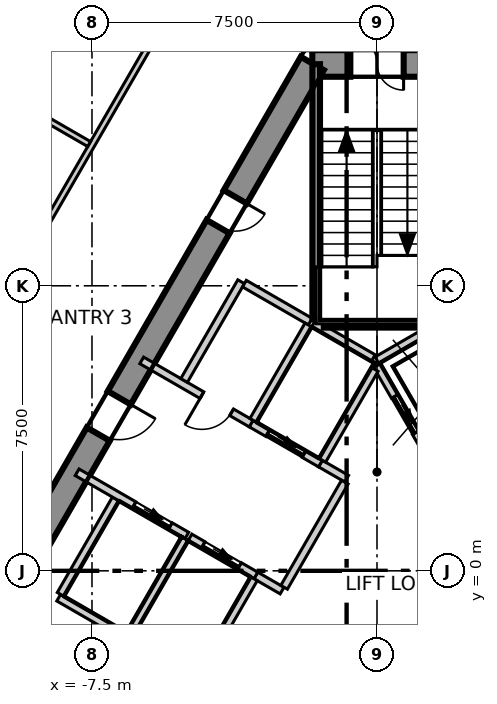
"""IFC4 building model, lengths in metres.
Left out: names, types, materials, properties, quantities, classifications, styles, units other than length and angle.
Written with IfcOpenShell. Run it as: python <this file> out.ifc"""

import sys

from ifc_helpers import new_model, si_unit, direction, frame, frame_2d, origin, place, context, subcontext, project, spatial, polyline, rectangle, outline, extrude, element, fill, save


model = new_model("IFC4")
c1 = context("Model", 3, precision=1e-05, world=origin(), true_north=direction((0.0, 1.0)))
c2 = subcontext(c1, "Body", "Model", "MODEL_VIEW")
j1 = project(units=[si_unit("LENGTHUNIT", "METRE"), si_unit("PLANEANGLEUNIT", "RADIAN")], contexts=[c1])
p1 = place(None, origin())
s1 = spatial("IfcSite", under=j1, at=p1, CompositionType="ELEMENT")
p2 = place(p1, origin())
s2 = spatial("IfcBuilding", under=s1, at=p2, CompositionType="ELEMENT")
p3 = place(p2, frame((0.0, 0.0, 227.3)))
s3 = spatial("IfcBuildingStorey", under=s2, at=p3, CompositionType="ELEMENT", Elevation=227.3)
p4 = place(p3, frame((1.703, 13.35, -0.3), z_axis=(0.0, 0.0, 1.0), x_axis=(-1.0, 0.0, 0.0)))
e1 = element("IfcWall", 1, at=p4, inside=s3, PredefinedType="SHEAR", context=c2, shape_type="SweptSolid", body=[
    extrude(outline(polyline([(-0.202, -0.35), (1.703, -0.35), (3.608, -0.35), (3.204, 0.35), (1.703, 0.35), (0.202, 0.35), (-0.202, -0.35)])), origin(), (0.0, 0.0, 1.0), 4.0),
])
p5 = place(p4, frame((1.003, 0.0, 0.3)))
e2 = element("IfcOpeningElement", 2, at=p5, cuts=e1, PredefinedType="OPENING", context=c2, shape_type="SweptSolid", body=[
    extrude(rectangle(XDim=1.4, YDim=2.1, at=frame_2d((0.7, 1.05))), frame((0.0, 0.36, 0.0), z_axis=(0.0, -1.0, 0.0), x_axis=(1.0, 0.0, 0.0)), (0.0, 0.0, 1.0), 0.72),
])
p6 = place(p3, frame((-1.703, 13.35, -0.3), z_axis=(0.0, 0.0, 1.0), x_axis=(-0.500011533395, -0.866018744874, 0.0)))
e3 = element("IfcWall", 3, at=p6, inside=s3, PredefinedType="SHEAR", context=c2, shape_type="SweptSolid", body=[
    extrude(outline(polyline([(-0.202, -0.35), (1.782, -0.35), (3.766, -0.35), (5.75, -0.35), (7.734, -0.35), (9.718, -0.35), (11.702, -0.35), (13.686, -0.35), (15.67, -0.35), (17.654, -0.35), (19.638, -0.35), (21.622, -0.35), (21.218, 0.35), (19.307, 0.35), (17.397, 0.35), (15.486, 0.35), (13.576, 0.35), (11.665, 0.35), (9.755, 0.35), (7.844, 0.35), (5.934, 0.35), (4.023, 0.35), (2.113, 0.35), (0.202, 0.35), (-0.202, -0.35)])), origin(), (0.0, 0.0, 1.0), 4.0),
])
p7 = place(p6, frame((10.16, 0.0, 0.3)))
e4 = element("IfcOpeningElement", 4, at=p7, cuts=e3, PredefinedType="OPENING", context=c2, shape_type="SweptSolid", body=[
    extrude(rectangle(XDim=1.1, YDim=2.1, at=frame_2d((0.55, 1.05))), frame((0.0, 0.36, 0.0), z_axis=(0.0, -1.0, 0.0), x_axis=(1.0, 0.0, 0.0)), (0.0, 0.0, 1.0), 0.72),
])
p8 = place(p6, frame((16.465, 0.0, 0.3)))
e5 = element("IfcOpeningElement", 5, at=p8, cuts=e3, PredefinedType="OPENING", context=c2, shape_type="SweptSolid", body=[
    extrude(rectangle(XDim=0.9, YDim=2.1, at=frame_2d((0.45, 1.05))), frame((0.0, 0.36, 0.0), z_axis=(0.0, -1.0, 0.0), x_axis=(1.0, 0.0, 0.0)), (0.0, 0.0, 1.0), 0.72),
])
p9 = place(p6, frame((4.055, 0.0, 0.3)))
e6 = element("IfcOpeningElement", 6, at=p9, cuts=e3, PredefinedType="OPENING", context=c2, shape_type="SweptSolid", body=[
    extrude(rectangle(XDim=0.9, YDim=2.1, at=frame_2d((0.45, 1.05))), frame((0.0, 0.36, 0.0), z_axis=(0.0, -1.0, 0.0), x_axis=(1.0, 0.0, 0.0)), (0.0, 0.0, 1.0), 0.72),
])
p10 = place(p3, frame((-2.732, 30.501, 0.0), z_axis=(0.0, 0.0, 1.0), x_axis=(-0.500023345841, -0.866011924637, 0.0)))
e7 = element("IfcWall", 7, at=p10, inside=s3, PredefinedType="ELEMENTEDWALL", context=c2, shape_type="SweptSolid", body=[
    extrude(rectangle(XDim=50.078, YDim=0.2, at=frame_2d((25.039, 0.0))), origin(), (0.0, 0.0, 1.0), 3.7),
])
p11 = place(p10, frame((2.171, 0.0, 0.9)))
e8 = element("IfcOpeningElement", 8, at=p11, cuts=e7, PredefinedType="OPENING", context=c2, shape_type="SweptSolid", body=[
    extrude(rectangle(XDim=4.2, YDim=2.5, at=frame_2d((2.1, 1.25))), frame((0.0, 0.11, 0.0), z_axis=(0.0, -1.0, 0.0), x_axis=(1.0, 0.0, 0.0)), (0.0, 0.0, 1.0), 0.22),
])
p12 = place(p10, frame((8.107, 0.0, 0.9)))
e9 = element("IfcOpeningElement", 9, at=p12, cuts=e7, PredefinedType="OPENING", context=c2, shape_type="SweptSolid", body=[
    extrude(rectangle(XDim=4.2, YDim=2.5, at=frame_2d((2.1, 1.25))), frame((0.0, 0.11, 0.0), z_axis=(0.0, -1.0, 0.0), x_axis=(1.0, 0.0, 0.0)), (0.0, 0.0, 1.0), 0.22),
])
p13 = place(p10, frame((14.044, 0.0, 0.9)))
e10 = element("IfcOpeningElement", 10, at=p13, cuts=e7, PredefinedType="OPENING", context=c2, shape_type="SweptSolid", body=[
    extrude(rectangle(XDim=4.2, YDim=2.5, at=frame_2d((2.1, 1.25))), frame((0.0, 0.11, 0.0), z_axis=(0.0, -1.0, 0.0), x_axis=(1.0, 0.0, 0.0)), (0.0, 0.0, 1.0), 0.22),
])
p14 = place(p10, frame((19.98, 0.0, 0.9)))
e11 = element("IfcOpeningElement", 11, at=p14, cuts=e7, PredefinedType="OPENING", context=c2, shape_type="SweptSolid", body=[
    extrude(rectangle(XDim=4.2, YDim=2.5, at=frame_2d((2.1, 1.25))), frame((0.0, 0.11, 0.0), z_axis=(0.0, -1.0, 0.0), x_axis=(1.0, 0.0, 0.0)), (0.0, 0.0, 1.0), 0.22),
])
p15 = place(p10, frame((25.917, 0.0, 0.9)))
e12 = element("IfcOpeningElement", 12, at=p15, cuts=e7, PredefinedType="OPENING", context=c2, shape_type="SweptSolid", body=[
    extrude(rectangle(XDim=4.2, YDim=2.5, at=frame_2d((2.1, 1.25))), frame((0.0, 0.11, 0.0), z_axis=(0.0, -1.0, 0.0), x_axis=(1.0, 0.0, 0.0)), (0.0, 0.0, 1.0), 0.22),
])
p16 = place(p10, frame((31.853, 0.0, 0.9)))
e13 = element("IfcOpeningElement", 13, at=p16, cuts=e7, PredefinedType="OPENING", context=c2, shape_type="SweptSolid", body=[
    extrude(rectangle(XDim=4.2, YDim=2.5, at=frame_2d((2.1, 1.25))), frame((0.0, 0.11, 0.0), z_axis=(0.0, -1.0, 0.0), x_axis=(1.0, 0.0, 0.0)), (0.0, 0.0, 1.0), 0.22),
])
p17 = place(p10, frame((37.79, 0.0, 0.9)))
e14 = element("IfcOpeningElement", 14, at=p17, cuts=e7, PredefinedType="OPENING", context=c2, shape_type="SweptSolid", body=[
    extrude(rectangle(XDim=4.2, YDim=2.5, at=frame_2d((2.1, 1.25))), frame((0.0, 0.11, 0.0), z_axis=(0.0, -1.0, 0.0), x_axis=(1.0, 0.0, 0.0)), (0.0, 0.0, 1.0), 0.22),
])
p18 = place(p10, frame((43.726, 0.0, 0.9)))
e15 = element("IfcOpeningElement", 15, at=p18, cuts=e7, PredefinedType="OPENING", context=c2, shape_type="SweptSolid", body=[
    extrude(rectangle(XDim=4.2, YDim=2.5, at=frame_2d((2.1, 1.25))), frame((0.0, 0.11, 0.0), z_axis=(0.0, -1.0, 0.0), x_axis=(1.0, 0.0, 0.0)), (0.0, 0.0, 1.0), 0.22),
])
p19 = place(p3, frame((-20.882, -11.969, 0.0), z_axis=(0.0, 0.0, 1.0), x_axis=(0.499998738735, 0.866026131975, 0.0)))
e16 = element("IfcWall", 16, at=p19, inside=s3, PredefinedType="PARTITIONING", context=c2, shape_type="SweptSolid", body=[
    extrude(rectangle(XDim=41.764, YDim=0.15, at=frame_2d((20.882, 0.0))), origin(), (0.0, 0.0, 1.0), 3.7),
])
p20 = place(p19, frame((33.714, 0.0, 0.0)))
e17 = element("IfcOpeningElement", 17, at=p20, cuts=e16, PredefinedType="OPENING", context=c2, shape_type="SweptSolid", body=[
    extrude(rectangle(XDim=1.1, YDim=2.1, at=frame_2d((0.55, 1.05))), frame((0.0, 0.085, 0.0), z_axis=(0.0, -1.0, 0.0), x_axis=(1.0, 0.0, 0.0)), (0.0, 0.0, 1.0), 0.17),
])
p21 = place(p19, frame((23.293, 0.0, 0.0)))
e18 = element("IfcOpeningElement", 18, at=p21, cuts=e16, PredefinedType="OPENING", context=c2, shape_type="SweptSolid", body=[
    extrude(rectangle(XDim=1.0, YDim=2.1, at=frame_2d((0.5, 1.05))), frame((0.0, 0.085, 0.0), z_axis=(0.0, -1.0, 0.0), x_axis=(1.0, 0.0, 0.0)), (0.0, 0.0, 1.0), 0.17),
])
p22 = place(p19, frame((13.356, 0.0, 0.0)))
e19 = element("IfcOpeningElement", 19, at=p22, cuts=e16, PredefinedType="OPENING", context=c2, shape_type="SweptSolid", body=[
    extrude(rectangle(XDim=1.1, YDim=2.1, at=frame_2d((0.55, 1.05))), frame((0.0, 0.085, 0.0), z_axis=(0.0, -1.0, 0.0), x_axis=(1.0, 0.0, 0.0)), (0.0, 0.0, 1.0), 0.17),
])
p23 = place(p19, frame((18.556, 0.0, 0.0)))
e20 = element("IfcOpeningElement", 20, at=p23, cuts=e16, PredefinedType="OPENING", context=c2, shape_type="SweptSolid", body=[
    extrude(rectangle(XDim=0.9, YDim=2.1, at=frame_2d((0.45, 1.05))), frame((0.0, 0.085, 0.0), z_axis=(0.0, -1.0, 0.0), x_axis=(1.0, 0.0, 0.0)), (0.0, 0.0, 1.0), 0.17),
])
p24 = place(p19, frame((15.556, 0.0, 0.0)))
e21 = element("IfcOpeningElement", 21, at=p24, cuts=e16, PredefinedType="OPENING", context=c2, shape_type="SweptSolid", body=[
    extrude(rectangle(XDim=0.9, YDim=2.1, at=frame_2d((0.45, 1.05))), frame((0.0, 0.085, 0.0), z_axis=(0.0, -1.0, 0.0), x_axis=(1.0, 0.0, 0.0)), (0.0, 0.0, 1.0), 0.17),
])
p25 = place(p19, frame((3.883, 0.0, 0.0)))
e22 = element("IfcOpeningElement", 22, at=p25, cuts=e16, PredefinedType="OPENING", context=c2, shape_type="SweptSolid", body=[
    extrude(rectangle(XDim=1.1, YDim=2.1, at=frame_2d((0.55, 1.05))), frame((0.0, 0.085, 0.0), z_axis=(0.0, -1.0, 0.0), x_axis=(1.0, 0.0, 0.0)), (0.0, 0.0, 1.0), 0.17),
])
p26 = place(p3, frame((-12.219, 13.91, 0.0), z_axis=(0.0, 0.0, 1.0), x_axis=(0.866052151752, -0.499953668299, 0.0)))
e23 = element("IfcWall", 23, at=p26, inside=s3, PredefinedType="PARTITIONING", context=c2, shape_type="SweptSolid", body=[
    extrude(rectangle(XDim=5.362, YDim=0.15, at=frame_2d((2.681, 0.0))), origin(), (0.0, 0.0, 1.0), 3.7),
])
p27 = place(p3, frame((0.075, 24.07, 0.0), z_axis=(0.0, 0.0, 1.0), x_axis=(0.49999939571, -0.866025752671, 0.0)))
e24 = element("IfcWall", 24, at=p27, inside=s3, PredefinedType="PARTITIONING", context=c2, shape_type="SweptSolid", body=[
    extrude(rectangle(XDim=41.614, YDim=0.15, at=frame_2d((20.807, 0.0))), origin(), (0.0, 0.0, 1.0), 3.7),
])
p28 = place(p27, frame((36.714, 0.0, 0.0)))
e25 = element("IfcOpeningElement", 25, at=p28, cuts=e24, PredefinedType="OPENING", context=c2, shape_type="SweptSolid", body=[
    extrude(rectangle(XDim=1.1, YDim=2.1, at=frame_2d((0.55, 1.05))), frame((0.0, 0.085, 0.0), z_axis=(0.0, -1.0, 0.0), x_axis=(1.0, 0.0, 0.0)), (0.0, 0.0, 1.0), 0.17),
])
p29 = place(p27, frame((21.831, 0.0, 0.0)))
e26 = element("IfcOpeningElement", 26, at=p29, cuts=e24, PredefinedType="OPENING", context=c2, shape_type="SweptSolid", body=[
    extrude(rectangle(XDim=1.1, YDim=2.1, at=frame_2d((0.55, 1.05))), frame((0.0, 0.085, 0.0), z_axis=(0.0, -1.0, 0.0), x_axis=(1.0, 0.0, 0.0)), (0.0, 0.0, 1.0), 0.17),
])
p30 = place(p27, frame((30.631, 0.0, 0.0)))
e27 = element("IfcOpeningElement", 27, at=p30, cuts=e24, PredefinedType="OPENING", context=c2, shape_type="SweptSolid", body=[
    extrude(rectangle(XDim=0.9, YDim=2.1, at=frame_2d((0.45, 1.05))), frame((0.0, 0.085, 0.0), z_axis=(0.0, -1.0, 0.0), x_axis=(1.0, 0.0, 0.0)), (0.0, 0.0, 1.0), 0.17),
])
p31 = place(p27, frame((27.431, 0.0, 0.0)))
e28 = element("IfcOpeningElement", 28, at=p31, cuts=e24, PredefinedType="OPENING", context=c2, shape_type="SweptSolid", body=[
    extrude(rectangle(XDim=0.9, YDim=2.1, at=frame_2d((0.45, 1.05))), frame((0.0, 0.085, 0.0), z_axis=(0.0, -1.0, 0.0), x_axis=(1.0, 0.0, 0.0)), (0.0, 0.0, 1.0), 0.17),
])
p32 = place(p27, frame((24.631, 0.0, 0.0)))
e29 = element("IfcOpeningElement", 29, at=p32, cuts=e24, PredefinedType="OPENING", context=c2, shape_type="SweptSolid", body=[
    extrude(rectangle(XDim=1.0, YDim=2.1, at=frame_2d((0.5, 1.05))), frame((0.0, 0.085, 0.0), z_axis=(0.0, -1.0, 0.0), x_axis=(1.0, 0.0, 0.0)), (0.0, 0.0, 1.0), 0.17),
])
p33 = place(p27, frame((14.358, 0.0, 0.0)))
e30 = element("IfcOpeningElement", 30, at=p33, cuts=e24, PredefinedType="OPENING", context=c2, shape_type="SweptSolid", body=[
    extrude(rectangle(XDim=1.1, YDim=2.1, at=frame_2d((0.55, 1.05))), frame((0.0, 0.085, 0.0), z_axis=(0.0, -1.0, 0.0), x_axis=(1.0, 0.0, 0.0)), (0.0, 0.0, 1.0), 0.17),
])
p34 = place(p27, frame((3.885, 0.0, 0.0)))
e31 = element("IfcOpeningElement", 31, at=p34, cuts=e24, PredefinedType="OPENING", context=c2, shape_type="SweptSolid", body=[
    extrude(rectangle(XDim=1.1, YDim=2.1, at=frame_2d((0.55, 1.05))), frame((0.0, 0.085, 0.0), z_axis=(0.0, -1.0, 0.0), x_axis=(1.0, 0.0, 0.0)), (0.0, 0.0, 1.0), 0.17),
])
p35 = place(p3, frame((-8.376, -0.707, 0.0), z_axis=(0.0, 0.0, 1.0), x_axis=(0.866067520717, -0.499927044236, 0.0)))
e32 = element("IfcWall", 32, at=p35, inside=s3, PredefinedType="SOLIDWALL", context=c2, shape_type="SweptSolid", body=[
    extrude(rectangle(XDim=2.1, YDim=0.2, at=frame_2d((1.05, 0.0))), origin(), (0.0, 0.0, 1.0), 3.7),
])
p36 = place(p3, frame((-8.326, -0.62, 0.0), z_axis=(0.0, 0.0, 1.0), x_axis=(0.500023687443, 0.866011727401, 0.0)))
e33 = element("IfcWall", 33, at=p36, inside=s3, PredefinedType="SOLIDWALL", context=c2, shape_type="SweptSolid", body=[
    extrude(rectangle(XDim=2.9, YDim=0.2, at=frame_2d((1.45, 0.0))), origin(), (0.0, 0.0, 1.0), 3.7),
])
p37 = place(p3, frame((-0.002, 5.541, 0.0), z_axis=(0.0, 0.0, 1.0), x_axis=(0.86600155993, 0.500041296494, 0.0)))
e34 = element("IfcWall", 34, at=p37, inside=s3, PredefinedType="SOLIDWALL", context=c2, shape_type="SweptSolid", body=[
    extrude(rectangle(XDim=4.132, YDim=0.2, at=frame_2d((2.066, 0.0))), origin(), (0.0, 0.0, 1.0), 3.7),
])
p38 = place(p3, frame((0.0, 5.4, 0.0), z_axis=(0.0, 0.0, 1.0), x_axis=(0.500103862429, -0.865965430478, 0.0)))
e35 = element("IfcWall", 35, at=p38, inside=s3, PredefinedType="SOLIDWALL", context=c2, shape_type="SweptSolid", body=[
    extrude(rectangle(XDim=2.973, YDim=0.2, at=frame_2d((1.487, 0.0))), origin(), (0.0, 0.0, 1.0), 3.7),
])
p39 = place(p38, frame((0.937, 0.0, 0.0)))
e36 = element("IfcOpeningElement", 36, at=p39, cuts=e35, PredefinedType="OPENING", context=c2, shape_type="SweptSolid", body=[
    extrude(rectangle(XDim=1.1, YDim=2.1, at=frame_2d((0.55, 1.05))), frame((0.0, 0.11, 0.0), z_axis=(0.0, -1.0, 0.0), x_axis=(1.0, 0.0, 0.0)), (0.0, 0.0, 1.0), 0.22),
])
p40 = place(p3, frame((-7.891, 2.593, 0.0), z_axis=(0.0, 0.0, 1.0), x_axis=(0.866070917804, -0.499921159118, 0.0)))
e37 = element("IfcWall", 37, at=p40, inside=s3, PredefinedType="SOLIDWALL", context=c2, shape_type="SweptSolid", body=[
    extrude(rectangle(XDim=3.333, YDim=0.2, at=frame_2d((1.666, 0.0))), origin(), (0.0, 0.0, 1.0), 3.7),
])
p41 = place(p40, frame((1.73, 0.0, 0.0)))
e38 = element("IfcOpeningElement", 38, at=p41, cuts=e37, PredefinedType="OPENING", context=c2, shape_type="SweptSolid", body=[
    extrude(rectangle(XDim=1.1, YDim=2.1, at=frame_2d((0.55, 1.05))), frame((0.0, 0.11, 0.0), z_axis=(0.0, -1.0, 0.0), x_axis=(1.0, 0.0, 0.0)), (0.0, 0.0, 1.0), 0.22),
])
p42 = place(p3, frame((-3.188, -0.122, 0.0), z_axis=(0.0, 0.0, 1.0), x_axis=(0.865705793592, -0.50055317294, 0.0)))
e39 = element("IfcWall", 39, at=p42, inside=s3, PredefinedType="SOLIDWALL", context=c2, shape_type="SweptSolid", body=[
    extrude(rectangle(XDim=0.797, YDim=0.2, at=frame_2d((0.398, 0.0))), origin(), (0.0, 0.0, 1.0), 3.7),
])
p43 = place(p3, frame((-6.191, 5.537, 0.0), z_axis=(0.0, 0.0, 1.0), x_axis=(0.866052607023, -0.499952879648, 0.0)))
e40 = element("IfcWall", 40, at=p43, inside=s3, PredefinedType="SOLIDWALL", context=c2, shape_type="SweptSolid", body=[
    extrude(rectangle(XDim=3.332, YDim=0.2, at=frame_2d((1.666, 0.0))), origin(), (0.0, 0.0, 1.0), 3.7),
])
p44 = place(p43, frame((1.83, 0.0, 0.0)))
e41 = element("IfcOpeningElement", 41, at=p44, cuts=e40, PredefinedType="OPENING", context=c2, shape_type="SweptSolid", body=[
    extrude(rectangle(XDim=0.9, YDim=2.1, at=frame_2d((0.45, 1.05))), frame((0.0, 0.11, 0.0), z_axis=(0.0, -1.0, 0.0), x_axis=(1.0, 0.0, 0.0)), (0.0, 0.0, 1.0), 0.22),
])
p45 = place(p3, frame((-1.488, 2.822, 0.0), z_axis=(0.0, 0.0, 1.0), x_axis=(0.866236612152, -0.499633997809, 0.0)))
e42 = element("IfcWall", 42, at=p45, inside=s3, PredefinedType="SOLIDWALL", context=c2, shape_type="SweptSolid", body=[
    extrude(rectangle(XDim=0.796, YDim=0.2, at=frame_2d((0.398, 0.0))), origin(), (0.0, 0.0, 1.0), 3.7),
])
p46 = place(p3, frame((-5.076, 5.009, 0.0), z_axis=(0.0, 0.0, 1.0), x_axis=(0.50002537861, 0.866010750942, 0.0)))
e43 = element("IfcWall", 43, at=p46, inside=s3, PredefinedType="SOLIDWALL", context=c2, shape_type="SweptSolid", body=[
    extrude(rectangle(XDim=3.0, YDim=0.2, at=frame_2d((1.5, 0.0))), origin(), (0.0, 0.0, 1.0), 3.7),
])
p47 = place(p3, frame((-3.489, 7.557, 0.0), z_axis=(0.0, 0.0, 1.0), x_axis=(0.866010750942, -0.50002537861, 0.0)))
e44 = element("IfcWall", 44, at=p47, inside=s3, PredefinedType="SOLIDWALL", context=c2, shape_type="SweptSolid", body=[
    extrude(rectangle(XDim=2.0, YDim=0.2, at=frame_2d((1.0, 0.0))), origin(), (0.0, 0.0, 1.0), 3.7),
])
p48 = place(p3, frame((-2.444, -0.433, 0.0), z_axis=(0.0, 0.0, 1.0), x_axis=(0.500035624827, 0.866004834804, 0.0)))
e45 = element("IfcWall", 45, at=p48, inside=s3, PredefinedType="SOLIDWALL", context=c2, shape_type="SweptSolid", body=[
    extrude(rectangle(XDim=3.194, YDim=0.2, at=frame_2d((1.597, 0.0))), origin(), (0.0, 0.0, 1.0), 3.7),
])
p49 = place(p3, frame((-6.507, -1.67, 0.0), z_axis=(0.0, 0.0, 1.0), x_axis=(0.50012328804, 0.865954211699, 0.0)))
e46 = element("IfcWall", 46, at=p49, inside=s3, PredefinedType="SOLIDWALL", context=c2, shape_type="SweptSolid", body=[
    extrude(rectangle(XDim=2.9, YDim=0.2, at=frame_2d((1.45, 0.0))), origin(), (0.0, 0.0, 1.0), 3.7),
])
p50 = place(p3, frame((-4.922, 0.879, 0.0), z_axis=(0.0, 0.0, 1.0), x_axis=(0.866073918653, -0.499915960366, 0.0)))
e47 = element("IfcWall", 47, at=p50, inside=s3, PredefinedType="SOLIDWALL", context=c2, shape_type="SweptSolid", body=[
    extrude(rectangle(XDim=2.002, YDim=0.2, at=frame_2d((1.001, 0.0))), origin(), (0.0, 0.0, 1.0), 3.7),
])
p51 = place(p50, frame((0.402, 0.0, 0.0)))
e48 = element("IfcOpeningElement", 48, at=p51, cuts=e47, PredefinedType="OPENING", context=c2, shape_type="SweptSolid", body=[
    extrude(rectangle(XDim=1.1, YDim=2.1, at=frame_2d((0.55, 1.05))), frame((0.0, 0.11, 0.0), z_axis=(0.0, -1.0, 0.0), x_axis=(1.0, 0.0, 0.0)), (0.0, 0.0, 1.0), 0.22),
])
p52 = place(p3, frame((-4.619, -2.6, 0.0), z_axis=(0.0, 0.0, 1.0), x_axis=(0.50009492287, 0.865970593103, 0.0)))
e49 = element("IfcWall", 49, at=p52, inside=s3, PredefinedType="SOLIDWALL", context=c2, shape_type="SweptSolid", body=[
    extrude(rectangle(XDim=2.761, YDim=0.2, at=frame_2d((1.381, 0.0))), origin(), (0.0, 0.0, 1.0), 3.7),
])
p53 = place(p3, frame((-3.309, 3.873, 0.0), z_axis=(0.0, 0.0, 1.0), x_axis=(0.866098583652, -0.499873227325, 0.0)))
e50 = element("IfcWall", 50, at=p53, inside=s3, PredefinedType="SOLIDWALL", context=c2, shape_type="SweptSolid", body=[
    extrude(rectangle(XDim=2.103, YDim=0.2, at=frame_2d((1.051, 0.0))), origin(), (0.0, 0.0, 1.0), 3.7),
])
p54 = place(p53, frame((0.502, 0.0, 0.0)))
e51 = element("IfcOpeningElement", 51, at=p54, cuts=e50, PredefinedType="OPENING", context=c2, shape_type="SweptSolid", body=[
    extrude(rectangle(XDim=1.1, YDim=2.1, at=frame_2d((0.55, 1.05))), frame((0.0, 0.11, 0.0), z_axis=(0.0, -1.0, 0.0), x_axis=(1.0, 0.0, 0.0)), (0.0, 0.0, 1.0), 0.22),
])
p55 = place(p3, frame((-3.257, 3.959, 0.0), z_axis=(0.0, 0.0, 1.0), x_axis=(0.50012328804, 0.865954211699, 0.0)))
e52 = element("IfcWall", 52, at=p55, inside=s3, PredefinedType="SOLIDWALL", context=c2, shape_type="SweptSolid", body=[
    extrude(rectangle(XDim=2.9, YDim=0.2, at=frame_2d((1.45, 0.0))), origin(), (0.0, 0.0, 1.0), 3.7),
])
p56 = place(p3, frame((-1.67, 6.507, 0.0), z_axis=(0.0, 0.0, 1.0), x_axis=(0.865941441609, -0.500145398563, 0.0)))
e53 = element("IfcWall", 53, at=p56, inside=s3, PredefinedType="SOLIDWALL", context=c2, shape_type="SweptSolid", body=[
    extrude(rectangle(XDim=1.815, YDim=0.2, at=frame_2d((0.908, 0.0))), origin(), (0.0, 0.0, 1.0), 3.7),
])
p57 = place(p3, frame((-1.438, 2.909, 0.0), z_axis=(0.0, 0.0, 1.0), x_axis=(0.499829630636, 0.866123744241, 0.0)))
e54 = element("IfcWall", 54, at=p57, inside=s3, PredefinedType="SOLIDWALL", context=c2, shape_type="SweptSolid", body=[
    extrude(rectangle(XDim=2.761, YDim=0.2, at=frame_2d((1.38, 0.0))), origin(), (0.0, 0.0, 1.0), 3.7),
])
p58 = place(p3, frame((-1.4, 6.5, 0.0), z_axis=(0.0, 0.0, 1.0), x_axis=(1.0, 0.0, 0.0)))
e55 = element("IfcWall", 55, at=p58, inside=s3, PredefinedType="SOLIDWALL", context=c2, shape_type="SweptSolid", body=[
    extrude(rectangle(XDim=2.8, YDim=0.2, at=frame_2d((1.4, 0.0))), origin(), (0.0, 0.0, 1.0), 3.7),
])
p59 = place(p3, frame((-1.6, 6.615, 0.0), z_axis=(0.0, 0.0, 1.0), x_axis=(0.0, 1.0, 0.0)))
e56 = element("IfcWall", 56, at=p59, inside=s3, PredefinedType="SOLIDWALL", context=c2, shape_type="SweptSolid", body=[
    extrude(rectangle(XDim=6.715, YDim=0.2, at=frame_2d((3.357, 0.0))), origin(), (0.0, 0.0, 1.0), 3.7),
])
p60 = place(p39, origin())
e57 = element("IfcDoor", 57, at=p60, inside=s3, OperationType="SLIDING_TO_LEFT", PredefinedType="DOOR", context=c2, shape_type="SweptSolid", body=[
    extrude(rectangle(XDim=1.1, YDim=2.1, at=frame_2d((0.55, 1.05))), frame((0.0, 0.025, 0.0), z_axis=(0.0, -1.0, 0.0), x_axis=(1.0, 0.0, 0.0)), (0.0, 0.0, 1.0), 0.05),
])
fill(e36, e57)
p61 = place(p51, origin())
e58 = element("IfcDoor", 58, at=p61, inside=s3, OperationType="SLIDING_TO_LEFT", PredefinedType="DOOR", context=c2, shape_type="SweptSolid", body=[
    extrude(rectangle(XDim=1.1, YDim=2.1, at=frame_2d((0.55, 1.05))), frame((0.0, 0.025, 0.0), z_axis=(0.0, -1.0, 0.0), x_axis=(1.0, 0.0, 0.0)), (0.0, 0.0, 1.0), 0.05),
])
fill(e48, e58)
p62 = place(p54, origin())
e59 = element("IfcDoor", 59, at=p62, inside=s3, OperationType="SLIDING_TO_LEFT", PredefinedType="DOOR", context=c2, shape_type="SweptSolid", body=[
    extrude(rectangle(XDim=1.1, YDim=2.1, at=frame_2d((0.55, 1.05))), frame((0.0, 0.025, 0.0), z_axis=(0.0, -1.0, 0.0), x_axis=(1.0, 0.0, 0.0)), (0.0, 0.0, 1.0), 0.05),
])
fill(e51, e59)
p63 = place(p41, origin())
e60 = element("IfcDoor", 60, at=p63, inside=s3, OperationType="SLIDING_TO_LEFT", PredefinedType="DOOR", context=c2, shape_type="SweptSolid", body=[
    extrude(rectangle(XDim=1.1, YDim=2.1, at=frame_2d((0.55, 1.05))), frame((0.0, 0.025, 0.0), z_axis=(0.0, -1.0, 0.0), x_axis=(1.0, 0.0, 0.0)), (0.0, 0.0, 1.0), 0.05),
])
fill(e38, e60)
p64 = place(p44, origin())
e61 = element("IfcDoor", 61, at=p64, inside=s3, OperationType="SINGLE_SWING_LEFT", PredefinedType="DOOR", context=c2, shape_type="SweptSolid", body=[
    extrude(rectangle(XDim=0.9, YDim=2.1, at=frame_2d((0.45, 1.05))), frame((0.0, 0.025, 0.0), z_axis=(0.0, -1.0, 0.0), x_axis=(1.0, 0.0, 0.0)), (0.0, 0.0, 1.0), 0.05),
])
fill(e41, e61)
p65 = place(p5, origin())
e62 = element("IfcDoor", 62, at=p65, inside=s3, OperationType="DOUBLE_DOOR_SINGLE_SWING", PredefinedType="DOOR", context=c2, shape_type="SweptSolid", body=[
    extrude(rectangle(XDim=1.4, YDim=2.1, at=frame_2d((0.7, 1.05))), frame((0.0, 0.025, 0.0), z_axis=(0.0, -1.0, 0.0), x_axis=(1.0, 0.0, 0.0)), (0.0, 0.0, 1.0), 0.05),
])
fill(e2, e62)
p66 = place(p7, origin())
e63 = element("IfcDoor", 63, at=p66, inside=s3, OperationType="SINGLE_SWING_RIGHT", PredefinedType="DOOR", context=c2, shape_type="SweptSolid", body=[
    extrude(rectangle(XDim=1.1, YDim=2.1, at=frame_2d((0.55, 1.05))), frame((0.0, 0.025, 0.0), z_axis=(0.0, -1.0, 0.0), x_axis=(1.0, 0.0, 0.0)), (0.0, 0.0, 1.0), 0.05),
])
fill(e4, e63)
p67 = place(p9, origin())
e64 = element("IfcDoor", 64, at=p67, inside=s3, OperationType="SINGLE_SWING_RIGHT", PredefinedType="DOOR", context=c2, shape_type="SweptSolid", body=[
    extrude(rectangle(XDim=0.9, YDim=2.1, at=frame_2d((0.45, 1.05))), frame((0.0, 0.025, 0.0), z_axis=(0.0, -1.0, 0.0), x_axis=(1.0, 0.0, 0.0)), (0.0, 0.0, 1.0), 0.05),
])
fill(e6, e64)
save(model, sys.argv[1])
